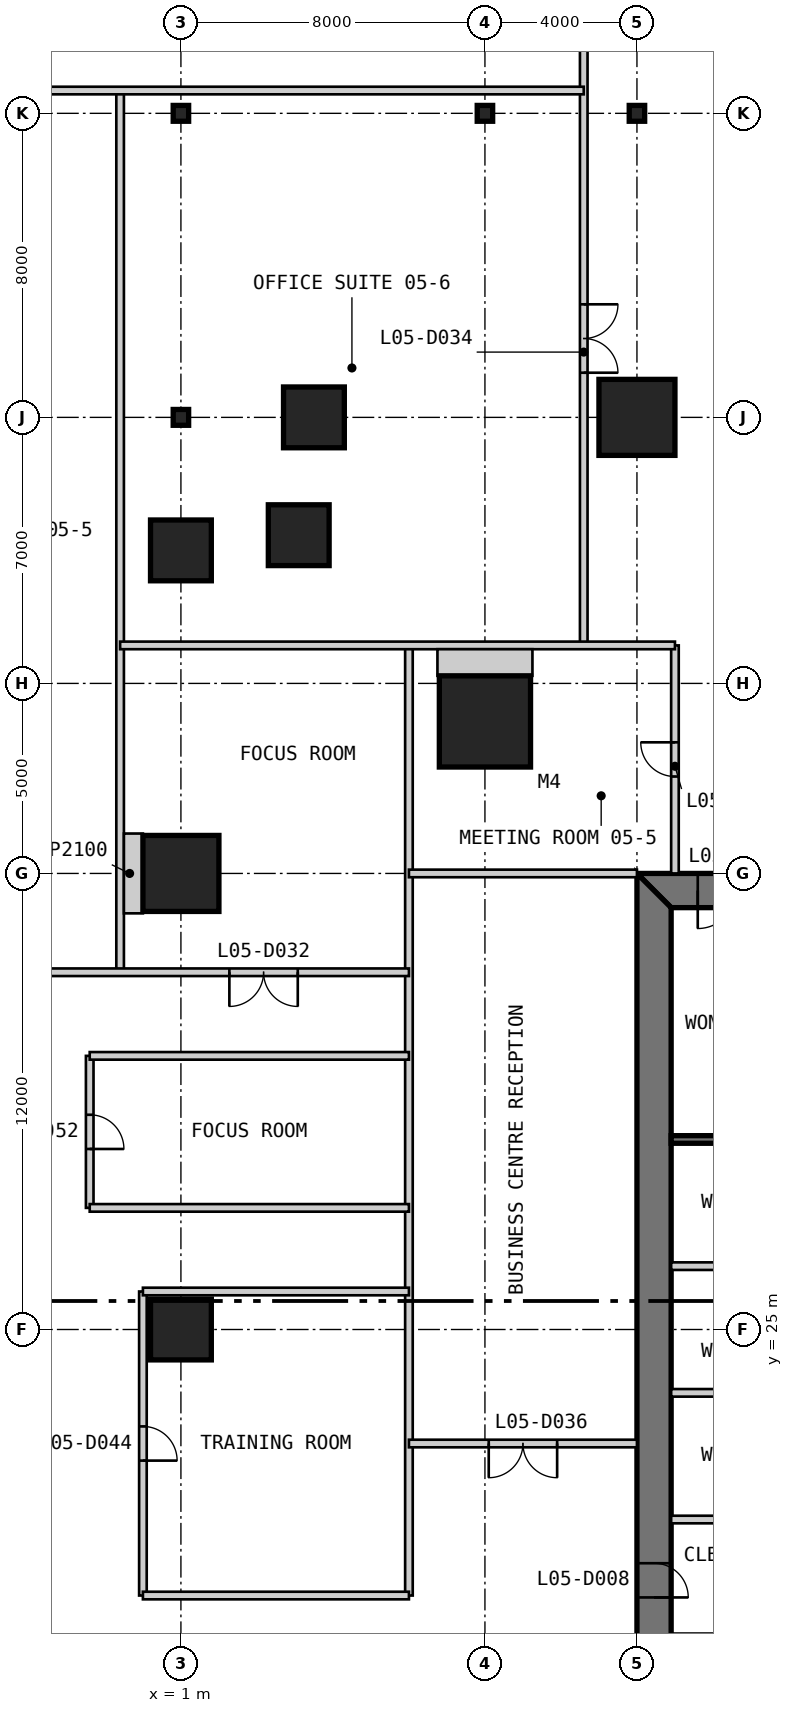
"""IFC4 building model, lengths in metres.
Left out: names, types, materials, properties, quantities, classifications, styles, units other than length and angle.
Written with IfcOpenShell. Run it as: python <this file> out.ifc"""

import sys

from ifc_helpers import new_model, si_unit, direction, frame, frame_2d, origin, origin_2d, place, context, subcontext, project, spatial, polyline, rectangle, i_section, outline, extrude, element, fill, save


model = new_model("IFC4")
c1 = context("Model", 3, precision=1e-05, world=origin(), true_north=direction((0.0, 1.0)))
c2 = subcontext(c1, "Body", "Model", "MODEL_VIEW")
j1 = project(units=[si_unit("LENGTHUNIT", "METRE"), si_unit("PLANEANGLEUNIT", "RADIAN")], contexts=[c1])
p1 = place(None, origin())
s1 = spatial("IfcSite", under=j1, at=p1, CompositionType="ELEMENT")
p2 = place(p1, origin())
s2 = spatial("IfcBuilding", under=s1, at=p2, CompositionType="ELEMENT")
p3 = place(p2, frame((0.0, 0.0, 26.2)))
s3 = spatial("IfcBuildingStorey", under=s2, at=p3, CompositionType="ELEMENT", Elevation=26.2)
p4 = place(p3, frame((9.0, 41.0, 0.0), z_axis=(0.0, 0.0, 1.0), x_axis=(1.0, 0.0, 0.0)))
e1 = element("IfcColumn", 1, at=p4, inside=s3, PredefinedType="COLUMN", context=c2, shape_type="SweptSolid", body=[
    extrude(rectangle(XDim=2.4, YDim=2.4, at=origin_2d()), origin(), (0.0, 0.0, 1.0), 4.8),
])
p5 = place(p3, frame((13.0, 49.0, 0.0), z_axis=(0.0, 0.0, 1.0), x_axis=(1.0, 0.0, 0.0)))
e2 = element("IfcColumn", 2, at=p5, inside=s3, PredefinedType="COLUMN", context=c2, shape_type="SweptSolid", body=[
    extrude(rectangle(XDim=2.0, YDim=2.0, at=origin_2d()), origin(), (0.0, 0.0, 1.0), 4.8),
])
for number, where, z_axis, x_axis in (
    (3, (4.5, 49.0, 0.0), (0.0, 0.0, 1.0), (1.0, 0.0, 0.0)),
    (4, (4.1, 45.9, 0.0), (0.0, 0.0, 1.0), (1.0, 0.0, 0.0)),
    (5, (1.0, 45.5, 0.0), (0.0, 0.0, 1.0), (1.0, 0.0, 0.0)),
):
    element("IfcColumn", number, at=place(p3, frame(where, z_axis=z_axis, x_axis=x_axis)), inside=s3, PredefinedType="COLUMN", context=c2, shape_type="SweptSolid", body=[
        extrude(rectangle(XDim=1.6, YDim=1.6, at=origin_2d()), origin(), (0.0, 0.0, 1.0), 4.8),
    ])
p6 = place(p3, frame((1.0, 37.0, 0.0), z_axis=(0.0, 0.0, 1.0), x_axis=(1.0, 0.0, 0.0)))
e6 = element("IfcColumn", 6, at=p6, inside=s3, PredefinedType="COLUMN", context=c2, shape_type="SweptSolid", body=[
    extrude(rectangle(XDim=2.0, YDim=2.0, at=origin_2d()), origin(), (0.0, 0.0, 1.0), 4.8),
])
p7 = place(p3, frame((1.0, 25.0, 0.0), z_axis=(0.0, 0.0, 1.0), x_axis=(1.0, 0.0, 0.0)))
e7 = element("IfcColumn", 7, at=p7, inside=s3, PredefinedType="COLUMN", context=c2, shape_type="SweptSolid", body=[
    extrude(rectangle(XDim=1.6, YDim=1.6, at=origin_2d()), origin(), (0.0, 0.0, 1.0), 4.8),
])
for number, where, z_axis, x_axis in (
    (8, (1.0, 49.0, 0.0), (0.0, 0.0, 1.0), (1.0, 0.0, 0.0)),
    (9, (1.0, 57.0, 0.0), (0.0, 0.0, 1.0), (1.0, 0.0, 0.0)),
    (10, (9.0, 57.0, 0.0), (0.0, 0.0, 1.0), (1.0, 0.0, 0.0)),
    (11, (13.0, 57.0, 0.0), (0.0, 0.0, 1.0), (1.0, 0.0, 0.0)),
):
    element("IfcColumn", number, at=place(p3, frame(where, z_axis=z_axis, x_axis=x_axis)), inside=s3, PredefinedType="COLUMN", context=c2, shape_type="SweptSolid", body=[
        extrude(i_section(OverallWidth=0.406, OverallDepth=0.417, WebThickness=0.03, FlangeThickness=0.048, at=origin_2d()), origin(), (0.0, 0.0, 1.0), 4.8),
    ])
p8 = place(p3, frame((37.0, 36.55, 0.0), z_axis=(0.0, 0.0, 1.0), x_axis=(-1.0, 0.0, 0.0)))
e12 = element("IfcWall", 12, at=p8, inside=s3, PredefinedType="SHEAR", context=c2, shape_type="SweptSolid", body=[
    extrude(outline(polyline([(0.0, -0.45), (24.0, -0.45), (23.1, 0.45), (0.9, 0.45), (0.0, -0.45)])), origin(), (0.0, 0.0, 1.0), 4.8),
])
p9 = place(p8, frame((4.9, 0.0, 0.0)))
e13 = element("IfcOpeningElement", 13, at=p9, cuts=e12, PredefinedType="OPENING", context=c2, shape_type="SweptSolid", body=[
    extrude(rectangle(XDim=1.0, YDim=2.2, at=frame_2d((0.5, 1.1))), frame((0.0, 0.46, 0.0), z_axis=(0.0, -1.0, 0.0), x_axis=(1.0, 0.0, 0.0)), (0.0, 0.0, 1.0), 0.92),
])
p10 = place(p8, frame((8.9, 0.0, 0.0)))
e14 = element("IfcOpeningElement", 14, at=p10, cuts=e12, PredefinedType="OPENING", context=c2, shape_type="SweptSolid", body=[
    extrude(rectangle(XDim=1.1, YDim=2.2, at=frame_2d((0.55, 1.1))), frame((0.0, 0.46, 0.0), z_axis=(0.0, -1.0, 0.0), x_axis=(1.0, 0.0, 0.0)), (0.0, 0.0, 1.0), 0.92),
])
p11 = place(p8, frame((15.05, 0.0, 0.0)))
e15 = element("IfcOpeningElement", 15, at=p11, cuts=e12, PredefinedType="OPENING", context=c2, shape_type="SweptSolid", body=[
    extrude(rectangle(XDim=0.9, YDim=2.2, at=frame_2d((0.45, 1.1))), frame((0.0, 0.46, 0.0), z_axis=(0.0, -1.0, 0.0), x_axis=(1.0, 0.0, 0.0)), (0.0, 0.0, 1.0), 0.92),
])
p12 = place(p8, frame((17.9, 0.0, 0.0)))
e16 = element("IfcOpeningElement", 16, at=p12, cuts=e12, PredefinedType="OPENING", context=c2, shape_type="SweptSolid", body=[
    extrude(rectangle(XDim=1.0, YDim=2.2, at=frame_2d((0.5, 1.1))), frame((0.0, 0.46, 0.0), z_axis=(0.0, -1.0, 0.0), x_axis=(1.0, 0.0, 0.0)), (0.0, 0.0, 1.0), 0.92),
])
p13 = place(p8, frame((21.4, 0.0, 0.0)))
e17 = element("IfcOpeningElement", 17, at=p13, cuts=e12, PredefinedType="OPENING", context=c2, shape_type="SweptSolid", body=[
    extrude(rectangle(XDim=1.0, YDim=2.2, at=frame_2d((0.5, 1.1))), frame((0.0, 0.46, 0.0), z_axis=(0.0, -1.0, 0.0), x_axis=(1.0, 0.0, 0.0)), (0.0, 0.0, 1.0), 0.92),
])
p14 = place(p3, frame((13.45, 36.1, 0.0), z_axis=(0.0, 0.0, 1.0), x_axis=(0.0, -1.0, 0.0)))
e18 = element("IfcWall", 18, at=p14, inside=s3, PredefinedType="SHEAR", context=c2, shape_type="SweptSolid", body=[
    extrude(outline(polyline([(-0.9, -0.45), (23.1, -0.45), (22.2, 0.45), (0.0, 0.45), (-0.9, -0.45)])), origin(), (0.0, 0.0, 1.0), 4.8),
])
p15 = place(p14, frame((20.2, 0.0, 0.0)))
e19 = element("IfcOpeningElement", 19, at=p15, cuts=e18, PredefinedType="OPENING", context=c2, shape_type="SweptSolid", body=[
    extrude(rectangle(XDim=1.0, YDim=2.2, at=frame_2d((0.5, 1.1))), frame((0.0, 0.46, 0.0), z_axis=(0.0, -1.0, 0.0), x_axis=(1.0, 0.0, 0.0)), (0.0, 0.0, 1.0), 0.92),
])
p16 = place(p14, frame((17.25, 0.0, 0.0)))
e20 = element("IfcOpeningElement", 20, at=p16, cuts=e18, PredefinedType="OPENING", context=c2, shape_type="SweptSolid", body=[
    extrude(rectangle(XDim=0.9, YDim=2.2, at=frame_2d((0.45, 1.1))), frame((0.0, 0.46, 0.0), z_axis=(0.0, -1.0, 0.0), x_axis=(1.0, 0.0, 0.0)), (0.0, 0.0, 1.0), 0.92),
])
for number, where, z_axis, x_axis in (
    (21, (13.9, 20.0, 0.0), (0.0, 0.0, 1.0), (1.0, 0.0, 0.0)),
    (22, (13.9, 23.333, 0.0), (0.0, 0.0, 1.0), (1.0, 0.0, 0.0)),
    (23, (13.9, 26.667, 0.0), (0.0, 0.0, 1.0), (1.0, 0.0, 0.0)),
):
    element("IfcWall", number, at=place(p3, frame(where, z_axis=z_axis, x_axis=x_axis)), inside=s3, PredefinedType="PARTITIONING", context=c2, shape_type="SweptSolid", body=[
        extrude(rectangle(XDim=2.8, YDim=0.2, at=frame_2d((1.4, 0.0))), origin(), (0.0, 0.0, 1.0), 4.6),
    ])
p17 = place(p3, frame((29.7, 30.0, 0.0), z_axis=(0.0, 0.0, 1.0), x_axis=(-1.0, 0.0, 0.0)))
e24 = element("IfcWall", 24, at=p17, inside=s3, PredefinedType="SOLIDWALL", context=c2, shape_type="SweptSolid", body=[
    extrude(rectangle(XDim=15.8, YDim=0.2, at=frame_2d((7.9, 0.0))), origin(), (0.0, 0.0, 1.0), 4.6),
])
p18 = place(p3, frame((-1.4, 28.2, 0.0), z_axis=(0.0, 0.0, 1.0), x_axis=(0.0, 1.0, 0.0)))
e25 = element("IfcWall", 25, at=p18, inside=s3, PredefinedType="PARTITIONING", context=c2, shape_type="SweptSolid", body=[
    extrude(rectangle(XDim=4.0, YDim=0.2, at=frame_2d((2.0, 0.0))), origin(), (0.0, 0.0, 1.0), 4.5),
])
p19 = place(p18, frame((1.55, 0.0, 0.0)))
e26 = element("IfcOpeningElement", 26, at=p19, cuts=e25, PredefinedType="OPENING", context=c2, shape_type="SweptSolid", body=[
    extrude(rectangle(XDim=0.9, YDim=2.2, at=frame_2d((0.45, 1.1))), frame((0.0, 0.11, 0.0), z_axis=(0.0, -1.0, 0.0), x_axis=(1.0, 0.0, 0.0)), (0.0, 0.0, 1.0), 0.22),
])
p20 = place(p3, frame((-0.6, 34.4, 0.0), z_axis=(0.0, 0.0, 1.0), x_axis=(0.0, 1.0, 0.0)))
e27 = element("IfcWall", 27, at=p20, inside=s3, PredefinedType="PARTITIONING", context=c2, shape_type="SweptSolid", body=[
    extrude(rectangle(XDim=23.2, YDim=0.2, at=frame_2d((11.6, 0.0))), origin(), (0.0, 0.0, 1.0), 4.5),
])
p21 = place(p3, frame((0.0, 18.0, 0.0), z_axis=(0.0, 0.0, 1.0), x_axis=(0.0, 1.0, 0.0)))
e28 = element("IfcWall", 28, at=p21, inside=s3, PredefinedType="PARTITIONING", context=c2, shape_type="SweptSolid", body=[
    extrude(rectangle(XDim=8.0, YDim=0.2, at=frame_2d((4.0, 0.0))), origin(), (0.0, 0.0, 1.0), 4.5),
])
p22 = place(p21, frame((3.55, 0.0, 0.0)))
e29 = element("IfcOpeningElement", 29, at=p22, cuts=e28, PredefinedType="OPENING", context=c2, shape_type="SweptSolid", body=[
    extrude(rectangle(XDim=0.9, YDim=2.2, at=frame_2d((0.45, 1.1))), frame((0.0, 0.11, 0.0), z_axis=(0.0, -1.0, 0.0), x_axis=(1.0, 0.0, 0.0)), (0.0, 0.0, 1.0), 0.22),
])
p23 = place(p3, frame((7.0, 18.0, 0.0), z_axis=(0.0, 0.0, 1.0), x_axis=(0.0, 1.0, 0.0)))
e30 = element("IfcWall", 30, at=p23, inside=s3, PredefinedType="PARTITIONING", context=c2, shape_type="SweptSolid", body=[
    extrude(rectangle(XDim=25.0, YDim=0.2, at=frame_2d((12.5, 0.0))), origin(), (0.0, 0.0, 1.0), 3.893),
])
p24 = place(p3, frame((11.6, 43.0, 0.0), z_axis=(0.0, 0.0, 1.0), x_axis=(0.0, 1.0, 0.0)))
e31 = element("IfcWall", 31, at=p24, inside=s3, PredefinedType="PARTITIONING", context=c2, shape_type="SweptSolid", body=[
    extrude(rectangle(XDim=22.25, YDim=0.2, at=frame_2d((11.125, 0.0))), origin(), (0.0, 0.0, 1.0), 4.5),
])
p25 = place(p24, frame((7.175, 0.0, 0.0)))
e32 = element("IfcOpeningElement", 32, at=p25, cuts=e31, PredefinedType="OPENING", context=c2, shape_type="SweptSolid", body=[
    extrude(rectangle(XDim=1.8, YDim=2.4, at=frame_2d((0.9, 1.2))), frame((0.0, 0.11, 0.0), z_axis=(0.0, -1.0, 0.0), x_axis=(1.0, 0.0, 0.0)), (0.0, 0.0, 1.0), 0.22),
])
p26 = place(p24, frame((17.5, 0.0, 0.0)))
e33 = element("IfcOpeningElement", 33, at=p26, cuts=e31, PredefinedType="OPENING", context=c2, shape_type="SweptSolid", body=[
    extrude(rectangle(XDim=1.8, YDim=2.4, at=frame_2d((0.9, 1.2))), frame((0.0, 0.11, 0.0), z_axis=(0.0, -1.0, 0.0), x_axis=(1.0, 0.0, 0.0)), (0.0, 0.0, 1.0), 0.22),
])
p27 = place(p3, frame((14.0, 37.0, 0.0), z_axis=(0.0, 0.0, 1.0), x_axis=(0.0, 1.0, 0.0)))
e34 = element("IfcWall", 34, at=p27, inside=s3, PredefinedType="PARTITIONING", context=c2, shape_type="SweptSolid", body=[
    extrude(rectangle(XDim=6.0, YDim=0.2, at=frame_2d((3.0, 0.0))), origin(), (0.0, 0.0, 1.0), 4.5),
])
p28 = place(p27, frame((2.55, 0.0, 0.0)))
e35 = element("IfcOpeningElement", 35, at=p28, cuts=e34, PredefinedType="OPENING", context=c2, shape_type="SweptSolid", body=[
    extrude(rectangle(XDim=0.9, YDim=2.2, at=frame_2d((0.45, 1.1))), frame((0.0, 0.11, 0.0), z_axis=(0.0, -1.0, 0.0), x_axis=(1.0, 0.0, 0.0)), (0.0, 0.0, 1.0), 0.22),
])
p29 = place(p3, frame((0.0, 18.0, 0.0), z_axis=(0.0, 0.0, 1.0), x_axis=(1.0, 0.0, 0.0)))
e36 = element("IfcWall", 36, at=p29, inside=s3, PredefinedType="PARTITIONING", context=c2, shape_type="SweptSolid", body=[
    extrude(rectangle(XDim=7.0, YDim=0.2, at=frame_2d((3.5, 0.0))), origin(), (0.0, 0.0, 1.0), 4.5),
])
p30 = place(p3, frame((7.0, 22.0, 0.0), z_axis=(0.0, 0.0, 1.0), x_axis=(1.0, 0.0, 0.0)))
e37 = element("IfcWall", 37, at=p30, inside=s3, PredefinedType="PARTITIONING", context=c2, shape_type="SweptSolid", body=[
    extrude(rectangle(XDim=6.0, YDim=0.2, at=frame_2d((3.0, 0.0))), origin(), (0.0, 0.0, 1.0), 4.5),
])
p31 = place(p30, frame((2.1, 0.0, 0.0)))
e38 = element("IfcOpeningElement", 38, at=p31, cuts=e37, PredefinedType="OPENING", context=c2, shape_type="SweptSolid", body=[
    extrude(rectangle(XDim=1.8, YDim=2.4, at=frame_2d((0.9, 1.2))), frame((0.0, 0.11, 0.0), z_axis=(0.0, -1.0, 0.0), x_axis=(1.0, 0.0, 0.0)), (0.0, 0.0, 1.0), 0.22),
])
p32 = place(p3, frame((0.0, 26.0, 0.0), z_axis=(0.0, 0.0, 1.0), x_axis=(1.0, 0.0, 0.0)))
e39 = element("IfcWall", 39, at=p32, inside=s3, PredefinedType="PARTITIONING", context=c2, shape_type="SweptSolid", body=[
    extrude(rectangle(XDim=7.0, YDim=0.2, at=frame_2d((3.5, 0.0))), origin(), (0.0, 0.0, 1.0), 4.5),
])
for number, where, z_axis, x_axis in (
    (40, (-1.4, 28.2, 0.0), (0.0, 0.0, 1.0), (1.0, 0.0, 0.0)),
    (41, (-1.4, 32.2, 0.0), (0.0, 0.0, 1.0), (1.0, 0.0, 0.0)),
):
    element("IfcWall", number, at=place(p3, frame(where, z_axis=z_axis, x_axis=x_axis)), inside=s3, PredefinedType="PARTITIONING", context=c2, shape_type="SweptSolid", body=[
        extrude(rectangle(XDim=8.4, YDim=0.2, at=frame_2d((4.2, 0.0))), origin(), (0.0, 0.0, 1.0), 4.5),
    ])
p33 = place(p3, frame((-7.25, 34.4, 0.0), z_axis=(0.0, 0.0, 1.0), x_axis=(1.0, 0.0, 0.0)))
e42 = element("IfcWall", 42, at=p33, inside=s3, PredefinedType="PARTITIONING", context=c2, shape_type="SweptSolid", body=[
    extrude(rectangle(XDim=14.25, YDim=0.2, at=frame_2d((7.125, 0.0))), origin(), (0.0, 0.0, 1.0), 4.5),
])
p34 = place(p33, frame((9.525, 0.0, 0.0)))
e43 = element("IfcOpeningElement", 43, at=p34, cuts=e42, PredefinedType="OPENING", context=c2, shape_type="SweptSolid", body=[
    extrude(rectangle(XDim=1.8, YDim=2.4, at=frame_2d((0.9, 1.2))), frame((0.0, 0.11, 0.0), z_axis=(0.0, -1.0, 0.0), x_axis=(1.0, 0.0, 0.0)), (0.0, 0.0, 1.0), 0.22),
])
p35 = place(p33, frame((2.45, 0.0, 0.0)))
e44 = element("IfcOpeningElement", 44, at=p35, cuts=e42, PredefinedType="OPENING", context=c2, shape_type="SweptSolid", body=[
    extrude(rectangle(XDim=1.8, YDim=2.4, at=frame_2d((0.9, 1.2))), frame((0.0, 0.11, 0.0), z_axis=(0.0, -1.0, 0.0), x_axis=(1.0, 0.0, 0.0)), (0.0, 0.0, 1.0), 0.22),
])
p36 = place(p3, frame((7.0, 37.0, 0.0), z_axis=(0.0, 0.0, 1.0), x_axis=(1.0, 0.0, 0.0)))
e45 = element("IfcWall", 45, at=p36, inside=s3, PredefinedType="PARTITIONING", context=c2, shape_type="SweptSolid", body=[
    extrude(rectangle(XDim=6.0, YDim=0.2, at=frame_2d((3.0, 0.0))), origin(), (0.0, 0.0, 1.0), 3.703),
])
p37 = place(p3, frame((-0.6, 43.0, 0.0), z_axis=(0.0, 0.0, 1.0), x_axis=(1.0, 0.0, 0.0)))
e46 = element("IfcWall", 46, at=p37, inside=s3, PredefinedType="PARTITIONING", context=c2, shape_type="SweptSolid", body=[
    extrude(rectangle(XDim=14.6, YDim=0.2, at=frame_2d((7.3, 0.0))), origin(), (0.0, 0.0, 1.0), 4.5),
])
p38 = place(p3, frame((-7.25, 57.6, 0.0), z_axis=(0.0, 0.0, 1.0), x_axis=(1.0, 0.0, 0.0)))
e47 = element("IfcWall", 47, at=p38, inside=s3, PredefinedType="PARTITIONING", context=c2, shape_type="SweptSolid", body=[
    extrude(rectangle(XDim=18.85, YDim=0.2, at=frame_2d((9.425, 0.0))), origin(), (0.0, 0.0, 1.0), 4.5),
])
p39 = place(p3, frame((-0.5, 37.0, 0.0), z_axis=(0.0, 0.0, 1.0), x_axis=(1.0, 0.0, 0.0)))
e48 = element("IfcWall", 48, at=p39, inside=s3, PredefinedType="PARTITIONING", context=c2, shape_type="SweptSolid", body=[
    extrude(rectangle(XDim=0.5, YDim=2.1, at=frame_2d((0.25, 0.0))), origin(), (0.0, 0.0, 1.0), 4.5),
])
p40 = place(p3, frame((9.0, 42.9, 0.0), z_axis=(0.0, 0.0, 1.0), x_axis=(0.0, -1.0, 0.0)))
e49 = element("IfcWall", 49, at=p40, inside=s3, PredefinedType="PARTITIONING", context=c2, shape_type="SweptSolid", body=[
    extrude(rectangle(XDim=0.7, YDim=2.5, at=frame_2d((0.35, 0.0))), origin(), (0.0, 0.0, 1.0), 4.5),
])
p41 = place(p16, origin())
e50 = element("IfcDoor", 50, at=p41, inside=s3, OperationType="SINGLE_SWING_RIGHT", PredefinedType="DOOR", context=c2, shape_type="SweptSolid", body=[
    extrude(rectangle(XDim=0.9, YDim=2.2, at=frame_2d((0.45, 1.1))), frame((0.0, 0.025, 0.0), z_axis=(0.0, -1.0, 0.0), x_axis=(1.0, 0.0, 0.0)), (0.0, 0.0, 1.0), 0.05),
    extrude(outline(polyline([(0.0, 0.0), (0.04, 0.0), (0.04, 2.16), (0.86, 2.16), (0.86, 0.0), (0.9, 0.0), (0.9, 2.2), (0.0, 2.2), (0.0, 0.0)])), frame((0.0, 0.3, 0.0), z_axis=(0.0, -1.0, 0.0), x_axis=(1.0, 0.0, 0.0)), (0.0, 0.0, 1.0), 0.6),
])
fill(e20, e50)
p42 = place(p13, origin())
e51 = element("IfcDoor", 51, at=p42, inside=s3, OperationType="SINGLE_SWING_RIGHT", PredefinedType="DOOR", context=c2, shape_type="SweptSolid", body=[
    extrude(rectangle(XDim=1.0, YDim=2.2, at=frame_2d((0.5, 1.1))), frame((0.0, 0.025, 0.0), z_axis=(0.0, -1.0, 0.0), x_axis=(1.0, 0.0, 0.0)), (0.0, 0.0, 1.0), 0.05),
    extrude(outline(polyline([(0.0, 0.0), (0.04, 0.0), (0.04, 2.16), (0.96, 2.16), (0.96, 0.0), (1.0, 0.0), (1.0, 2.2), (0.0, 2.2), (0.0, 0.0)])), frame((0.0, 0.3, 0.0), z_axis=(0.0, -1.0, 0.0), x_axis=(1.0, 0.0, 0.0)), (0.0, 0.0, 1.0), 0.6),
])
fill(e17, e51)
p43 = place(p34, frame((1.8, 0.0, 0.0), z_axis=(0.0, 0.0, 1.0), x_axis=(-1.0, 0.0, 0.0)))
e52 = element("IfcDoor", 52, at=p43, inside=s3, OperationType="DOUBLE_DOOR_SINGLE_SWING", PredefinedType="DOOR", context=c2, shape_type="SweptSolid", body=[
    extrude(rectangle(XDim=1.8, YDim=2.4, at=frame_2d((0.9, 1.2))), frame((0.0, 0.025, 0.0), z_axis=(0.0, -1.0, 0.0), x_axis=(1.0, 0.0, 0.0)), (0.0, 0.0, 1.0), 0.05),
])
fill(e43, e52)
p44 = place(p25, frame((1.8, 0.0, 0.0), z_axis=(0.0, 0.0, 1.0), x_axis=(-1.0, 0.0, 0.0)))
e53 = element("IfcDoor", 53, at=p44, inside=s3, OperationType="DOUBLE_DOOR_SINGLE_SWING", PredefinedType="DOOR", context=c2, shape_type="SweptSolid", body=[
    extrude(rectangle(XDim=1.8, YDim=2.4, at=frame_2d((0.9, 1.2))), frame((0.0, 0.025, 0.0), z_axis=(0.0, -1.0, 0.0), x_axis=(1.0, 0.0, 0.0)), (0.0, 0.0, 1.0), 0.05),
])
fill(e32, e53)
p45 = place(p31, frame((1.8, 0.0, 0.0), z_axis=(0.0, 0.0, 1.0), x_axis=(-1.0, 0.0, 0.0)))
e54 = element("IfcDoor", 54, at=p45, inside=s3, OperationType="DOUBLE_DOOR_SINGLE_SWING", PredefinedType="DOOR", context=c2, shape_type="SweptSolid", body=[
    extrude(rectangle(XDim=1.8, YDim=2.4, at=frame_2d((0.9, 1.2))), frame((0.0, 0.025, 0.0), z_axis=(0.0, -1.0, 0.0), x_axis=(1.0, 0.0, 0.0)), (0.0, 0.0, 1.0), 0.05),
])
fill(e38, e54)
p46 = place(p28, origin())
e55 = element("IfcDoor", 55, at=p46, inside=s3, OperationType="SINGLE_SWING_RIGHT", PredefinedType="DOOR", context=c2, shape_type="SweptSolid", body=[
    extrude(rectangle(XDim=0.9, YDim=2.2, at=frame_2d((0.45, 1.1))), frame((0.0, 0.025, 0.0), z_axis=(0.0, -1.0, 0.0), x_axis=(1.0, 0.0, 0.0)), (0.0, 0.0, 1.0), 0.05),
])
fill(e35, e55)
p47 = place(p22, frame((0.9, 0.0, 0.0), z_axis=(0.0, 0.0, 1.0), x_axis=(-1.0, 0.0, 0.0)))
e56 = element("IfcDoor", 56, at=p47, inside=s3, OperationType="SINGLE_SWING_RIGHT", PredefinedType="DOOR", context=c2, shape_type="SweptSolid", body=[
    extrude(rectangle(XDim=0.9, YDim=2.2, at=frame_2d((0.45, 1.1))), frame((0.0, 0.025, 0.0), z_axis=(0.0, -1.0, 0.0), x_axis=(1.0, 0.0, 0.0)), (0.0, 0.0, 1.0), 0.05),
])
fill(e29, e56)
p48 = place(p19, frame((0.9, 0.0, 0.0), z_axis=(0.0, 0.0, 1.0), x_axis=(-1.0, 0.0, 0.0)))
e57 = element("IfcDoor", 57, at=p48, inside=s3, OperationType="SINGLE_SWING_RIGHT", PredefinedType="DOOR", context=c2, shape_type="SweptSolid", body=[
    extrude(rectangle(XDim=0.9, YDim=2.2, at=frame_2d((0.45, 1.1))), frame((0.0, 0.025, 0.0), z_axis=(0.0, -1.0, 0.0), x_axis=(1.0, 0.0, 0.0)), (0.0, 0.0, 1.0), 0.05),
])
fill(e26, e57)
save(model, sys.argv[1])
